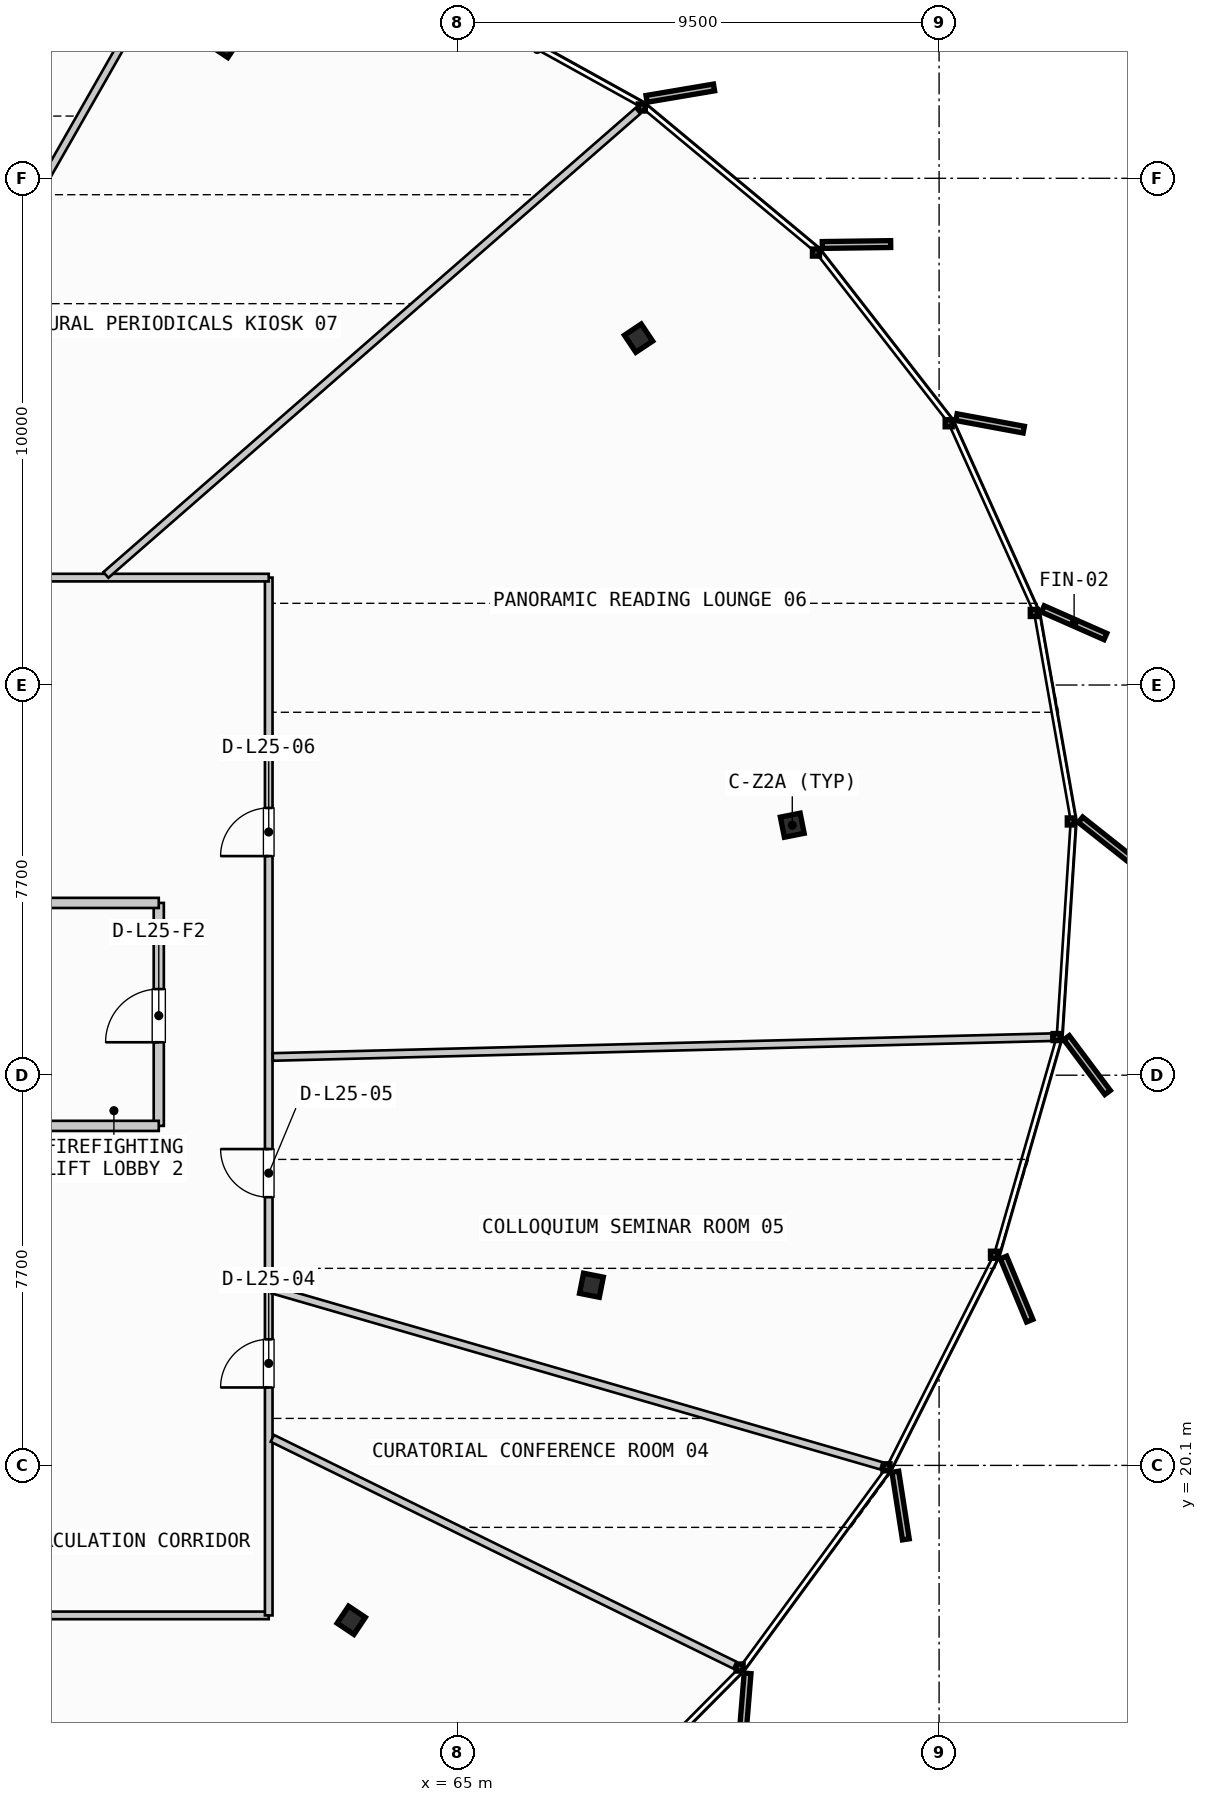
"""IFC4 building model, lengths in metres.
Left out: names, types, materials, properties, quantities, classifications, styles, units other than length and angle.
Written with IfcOpenShell. Run it as: python <this file> out.ifc"""

import sys

from ifc_helpers import new_model, si_unit, direction, frame, frame_2d, origin, origin_2d, place, context, subcontext, project, spatial, rectangle, i_section, extrude, source, transform, mapped, element, fill, save


model = new_model("IFC4")
c1 = context("Model", 3, precision=1e-05, world=origin(), true_north=direction((0.0, 1.0)))
c2 = subcontext(c1, "Body", "Model", "MODEL_VIEW")
j1 = project(units=[si_unit("LENGTHUNIT", "METRE"), si_unit("PLANEANGLEUNIT", "RADIAN")], contexts=[c1])
p1 = place(None, origin())
s1 = spatial("IfcSite", under=j1, at=p1, CompositionType="ELEMENT")
p2 = place(p1, origin())
s2 = spatial("IfcBuilding", under=s1, at=p2, CompositionType="ELEMENT")
p3 = place(p2, frame((0.0, 0.0, 103.6)))
s3 = spatial("IfcBuildingStorey", under=s2, at=p3, CompositionType="ELEMENT", Elevation=103.6)
m1 = source(origin(), c2, "Body", "SweptSolid", [
    extrude(i_section(OverallWidth=0.405, OverallDepth=0.398, WebThickness=0.035, FlangeThickness=0.056, FilletRadius=0.015, at=origin_2d()), origin(), (0.0, 0.0, 1.0), 3.35),
])
for number, where, z_axis, x_axis in (
    (1, (71.603, 32.733, 0.0), (0.0, 0.0, 1.0), (0.981, 0.195, 0.0)),
    (2, (68.569, 42.345, 0.0), (0.0, 0.0, 1.0), (0.831, 0.556, 0.0)),
    (3, (60.405, 48.161, 0.0), (0.0, 0.0, 1.0), (0.556, 0.831, 0.0)),
    (4, (62.899, 17.043, 0.0), (0.0, 0.0, 1.0), (0.831, -0.556, 0.0)),
    (5, (67.639, 23.655, 0.0), (0.0, 0.0, 1.0), (0.981, -0.195, 0.0)),
):
    element("IfcColumn", number, at=place(p3, frame(where, z_axis=z_axis, x_axis=x_axis)), inside=s3, PredefinedType="COLUMN", context=c2, shape_type="MappedRepresentation", body=[
        mapped(m1, transform((0.0, 0.0, 0.0), scale=1.0)),
    ])
p4 = place(p3, frame((59.1, 26.8, 0.0), z_axis=(0.0, 0.0, 1.0), x_axis=(0.0, 1.0, 0.0)))
e6 = element("IfcWall", 6, at=p4, inside=s3, PredefinedType="PARTITIONING", context=c2, shape_type="SweptSolid", body=[
    extrude(rectangle(XDim=4.4, YDim=0.2, at=frame_2d((2.2, 0.0))), origin(), (0.0, 0.0, 1.0), 2.28),
])
p5 = place(p4, frame((1.65, 0.0, 0.0)))
e7 = element("IfcOpeningElement", 7, at=p5, cuts=e6, PredefinedType="OPENING", context=c2, shape_type="SweptSolid", body=[
    extrude(rectangle(XDim=1.05, YDim=2.15, at=frame_2d((0.525, 1.075))), frame((0.0, 0.11, 0.0), z_axis=(0.0, -1.0, 0.0), x_axis=(1.0, 0.0, 0.0)), (0.0, 0.0, 1.0), 0.22),
])
for number, where, z_axis, x_axis in (
    (8, (55.885, 26.8, 0.0), (0.0, 0.0, 1.0), (1.0, 0.0, 0.0)),
    (9, (55.885, 31.2, 0.0), (0.0, 0.0, 1.0), (1.0, 0.0, 0.0)),
):
    element("IfcWall", number, at=place(p3, frame(where, z_axis=z_axis, x_axis=x_axis)), inside=s3, PredefinedType="PARTITIONING", context=c2, shape_type="SweptSolid", body=[
        extrude(rectangle(XDim=3.215, YDim=0.2, at=frame_2d((1.607, 0.0))), origin(), (0.0, 0.0, 1.0), 2.28),
    ])
p6 = place(p3, frame((32.85, 17.14, 0.0), z_axis=(0.0, 0.0, 1.0), x_axis=(1.0, 0.0, 0.0)))
e10 = element("IfcWall", 10, at=p6, inside=s3, PredefinedType="PARTITIONING", context=c2, shape_type="SweptSolid", body=[
    extrude(rectangle(XDim=28.42, YDim=0.15, at=frame_2d((14.21, 0.0))), origin(), (0.0, 0.0, 1.0), 2.28),
])
p7 = place(p6, frame((4.674, 0.0, 0.0)))
e11 = element("IfcOpeningElement", 11, at=p7, cuts=e10, PredefinedType="OPENING", context=c2, shape_type="SweptSolid", body=[
    extrude(rectangle(XDim=0.95, YDim=2.15, at=frame_2d((0.475, 1.075))), frame((0.0, 0.085, 0.0), z_axis=(0.0, -1.0, 0.0), x_axis=(1.0, 0.0, 0.0)), (0.0, 0.0, 1.0), 0.17),
])
p8 = place(p6, frame((12.2, 0.0, 0.0)))
e12 = element("IfcOpeningElement", 12, at=p8, cuts=e10, PredefinedType="OPENING", context=c2, shape_type="SweptSolid", body=[
    extrude(rectangle(XDim=0.95, YDim=2.15, at=frame_2d((0.475, 1.075))), frame((0.0, 0.085, 0.0), z_axis=(0.0, -1.0, 0.0), x_axis=(1.0, 0.0, 0.0)), (0.0, 0.0, 1.0), 0.17),
])
p9 = place(p6, frame((22.06, 0.0, 0.0)))
e13 = element("IfcOpeningElement", 13, at=p9, cuts=e10, PredefinedType="OPENING", context=c2, shape_type="SweptSolid", body=[
    extrude(rectangle(XDim=0.95, YDim=2.15, at=frame_2d((0.475, 1.075))), frame((0.0, 0.085, 0.0), z_axis=(0.0, -1.0, 0.0), x_axis=(1.0, 0.0, 0.0)), (0.0, 0.0, 1.0), 0.17),
])
p10 = place(p3, frame((61.27, 17.14, 0.0), z_axis=(0.0, 0.0, 1.0), x_axis=(0.0, 1.0, 0.0)))
e14 = element("IfcWall", 14, at=p10, inside=s3, PredefinedType="PARTITIONING", context=c2, shape_type="SweptSolid", body=[
    extrude(rectangle(XDim=20.48, YDim=0.15, at=frame_2d((10.24, 0.0))), origin(), (0.0, 0.0, 1.0), 2.28),
])
p11 = place(p10, frame((4.498, 0.0, 0.0)))
e15 = element("IfcOpeningElement", 15, at=p11, cuts=e14, PredefinedType="OPENING", context=c2, shape_type="SweptSolid", body=[
    extrude(rectangle(XDim=0.95, YDim=2.15, at=frame_2d((0.475, 1.075))), frame((0.0, 0.085, 0.0), z_axis=(0.0, -1.0, 0.0), x_axis=(1.0, 0.0, 0.0)), (0.0, 0.0, 1.0), 0.17),
])
p12 = place(p10, frame((8.253, 0.0, 0.0)))
e16 = element("IfcOpeningElement", 16, at=p12, cuts=e14, PredefinedType="OPENING", context=c2, shape_type="SweptSolid", body=[
    extrude(rectangle(XDim=0.95, YDim=2.15, at=frame_2d((0.475, 1.075))), frame((0.0, 0.085, 0.0), z_axis=(0.0, -1.0, 0.0), x_axis=(1.0, 0.0, 0.0)), (0.0, 0.0, 1.0), 0.17),
])
p13 = place(p10, frame((14.984, 0.0, 0.0)))
e17 = element("IfcOpeningElement", 17, at=p13, cuts=e14, PredefinedType="OPENING", context=c2, shape_type="SweptSolid", body=[
    extrude(rectangle(XDim=0.95, YDim=2.15, at=frame_2d((0.475, 1.075))), frame((0.0, 0.085, 0.0), z_axis=(0.0, -1.0, 0.0), x_axis=(1.0, 0.0, 0.0)), (0.0, 0.0, 1.0), 0.17),
])
p14 = place(p3, frame((61.27, 37.62, 0.0), z_axis=(0.0, 0.0, 1.0), x_axis=(-1.0, 0.0, 0.0)))
e18 = element("IfcWall", 18, at=p14, inside=s3, PredefinedType="PARTITIONING", context=c2, shape_type="SweptSolid", body=[
    extrude(rectangle(XDim=28.42, YDim=0.15, at=frame_2d((14.21, 0.0))), origin(), (0.0, 0.0, 1.0), 2.28),
])
p15 = place(p14, frame((5.539, 0.0, 0.0)))
e19 = element("IfcOpeningElement", 19, at=p15, cuts=e18, PredefinedType="OPENING", context=c2, shape_type="SweptSolid", body=[
    extrude(rectangle(XDim=0.95, YDim=2.15, at=frame_2d((0.475, 1.075))), frame((0.0, 0.085, 0.0), z_axis=(0.0, -1.0, 0.0), x_axis=(1.0, 0.0, 0.0)), (0.0, 0.0, 1.0), 0.17),
])
p16 = place(p14, frame((10.574, 0.0, 0.0)))
e20 = element("IfcOpeningElement", 20, at=p16, cuts=e18, PredefinedType="OPENING", context=c2, shape_type="SweptSolid", body=[
    extrude(rectangle(XDim=0.95, YDim=2.15, at=frame_2d((0.475, 1.075))), frame((0.0, 0.085, 0.0), z_axis=(0.0, -1.0, 0.0), x_axis=(1.0, 0.0, 0.0)), (0.0, 0.0, 1.0), 0.17),
])
p17 = place(p14, frame((16.148, 0.0, 0.0)))
e21 = element("IfcOpeningElement", 21, at=p17, cuts=e18, PredefinedType="OPENING", context=c2, shape_type="SweptSolid", body=[
    extrude(rectangle(XDim=0.95, YDim=2.15, at=frame_2d((0.475, 1.075))), frame((0.0, 0.085, 0.0), z_axis=(0.0, -1.0, 0.0), x_axis=(1.0, 0.0, 0.0)), (0.0, 0.0, 1.0), 0.17),
])
p18 = place(p14, frame((23.429, 0.0, 0.0)))
e22 = element("IfcOpeningElement", 22, at=p18, cuts=e18, PredefinedType="OPENING", context=c2, shape_type="SweptSolid", body=[
    extrude(rectangle(XDim=0.95, YDim=2.15, at=frame_2d((0.475, 1.075))), frame((0.0, 0.085, 0.0), z_axis=(0.0, -1.0, 0.0), x_axis=(1.0, 0.0, 0.0)), (0.0, 0.0, 1.0), 0.17),
])
p19 = place(p3, frame((61.342, 20.634, 0.0), z_axis=(0.0, 0.0, 1.0), x_axis=(0.897844588606, -0.440312496656, 0.0)))
e23 = element("IfcWall", 23, at=p19, inside=s3, PredefinedType="PARTITIONING", context=c2, shape_type="SweptSolid", body=[
    extrude(rectangle(XDim=10.166, YDim=0.15, at=frame_2d((5.083, 0.0))), origin(), (0.0, 0.0, 1.0), 2.28),
])
p20 = place(p3, frame((61.347, 23.567, 0.0), z_axis=(0.0, 0.0, 1.0), x_axis=(0.960628313882, -0.277836719259, 0.0)))
e24 = element("IfcWall", 24, at=p20, inside=s3, PredefinedType="PARTITIONING", context=c2, shape_type="SweptSolid", body=[
    extrude(rectangle(XDim=12.507, YDim=0.15, at=frame_2d((6.253, 0.0))), origin(), (0.0, 0.0, 1.0), 2.28),
])
p21 = place(p3, frame((61.35, 28.16, 0.0), z_axis=(0.0, 0.0, 1.0), x_axis=(0.999677848487, 0.025381080424, 0.0)))
e25 = element("IfcWall", 25, at=p21, inside=s3, PredefinedType="PARTITIONING", context=c2, shape_type="SweptSolid", body=[
    extrude(rectangle(XDim=15.371, YDim=0.15, at=frame_2d((7.686, 0.0))), origin(), (0.0, 0.0, 1.0), 2.28),
])
p22 = place(p3, frame((58.057, 37.673, 0.0), z_axis=(0.0, 0.0, 1.0), x_axis=(0.753623554102, 0.657306274656, 0.0)))
e26 = element("IfcWall", 26, at=p22, inside=s3, PredefinedType="PARTITIONING", context=c2, shape_type="SweptSolid", body=[
    extrude(rectangle(XDim=13.928, YDim=0.15, at=frame_2d((6.964, 0.0))), origin(), (0.0, 0.0, 1.0), 2.28),
])
p23 = place(p3, frame((52.41, 37.689, 0.0), z_axis=(0.0, 0.0, 1.0), x_axis=(0.495503023784, 0.868606213091, 0.0)))
e27 = element("IfcWall", 27, at=p23, inside=s3, PredefinedType="PARTITIONING", context=c2, shape_type="SweptSolid", body=[
    extrude(rectangle(XDim=15.011, YDim=0.15, at=frame_2d((7.506, 0.0))), origin(), (0.0, 0.0, 1.0), 2.28),
])
m2 = source(origin(), c2, "Body", "SweptSolid", [
    extrude(rectangle(XDim=1.05, YDim=2.15, at=frame_2d((0.525, 1.075))), frame((0.0, 0.025, 0.0), z_axis=(0.0, -1.0, 0.0), x_axis=(1.0, 0.0, 0.0)), (0.0, 0.0, 1.0), 0.05),
])
p24 = place(p5, origin())
e28 = element("IfcDoor", 28, at=p24, inside=s3, OperationType="SINGLE_SWING_LEFT", PredefinedType="DOOR", context=c2, shape_type="MappedRepresentation", body=[
    mapped(m2, transform((0.0, 0.0, 0.0), scale=1.0)),
])
fill(e7, e28)
m3 = source(origin(), c2, "Body", "SweptSolid", [
    extrude(rectangle(XDim=0.95, YDim=2.15, at=frame_2d((0.475, 1.075))), frame((0.0, 0.025, 0.0), z_axis=(0.0, -1.0, 0.0), x_axis=(1.0, 0.0, 0.0)), (0.0, 0.0, 1.0), 0.05),
])
p25 = place(p11, origin())
e29 = element("IfcDoor", 29, at=p25, inside=s3, OperationType="SINGLE_SWING_LEFT", PredefinedType="DOOR", context=c2, shape_type="MappedRepresentation", body=[
    mapped(m3, transform((0.0, 0.0, 0.0), scale=1.0)),
])
fill(e15, e29)
p26 = place(p12, origin())
e30 = element("IfcDoor", 30, at=p26, inside=s3, OperationType="SINGLE_SWING_RIGHT", PredefinedType="DOOR", context=c2, shape_type="MappedRepresentation", body=[
    mapped(m3, transform((0.0, 0.0, 0.0), scale=1.0)),
])
fill(e16, e30)
p27 = place(p13, origin())
e31 = element("IfcDoor", 31, at=p27, inside=s3, OperationType="SINGLE_SWING_LEFT", PredefinedType="DOOR", context=c2, shape_type="MappedRepresentation", body=[
    mapped(m3, transform((0.0, 0.0, 0.0), scale=1.0)),
])
fill(e17, e31)
save(model, sys.argv[1])
